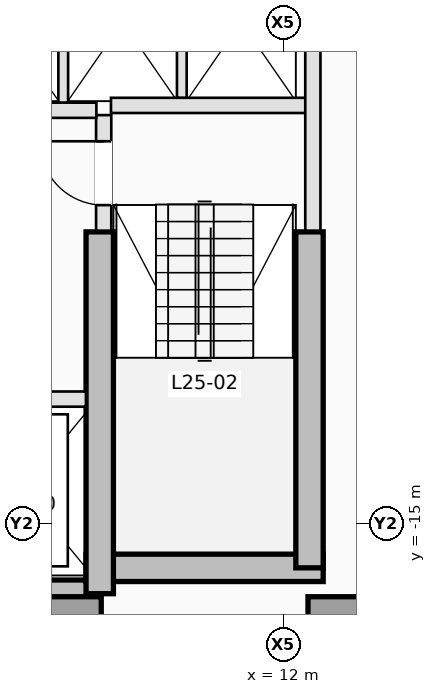
"""IFC4 building model, lengths in metres.
Left out: names, types, materials, properties, quantities, classifications, styles, units other than length and angle.
Written with IfcOpenShell. Run it as: python <this file> out.ifc"""

import sys

from ifc_helpers import new_model, si_unit, direction, frame, frame_2d, origin, origin_2d, place, context, subcontext, project, spatial, rectangle, extrude, element, fill, save


model = new_model("IFC4")
c1 = context("Model", 3, precision=1e-05, world=origin(), true_north=direction((0.0, 1.0)))
c2 = subcontext(c1, "Body", "Model", "MODEL_VIEW")
j1 = project(units=[si_unit("LENGTHUNIT", "METRE"), si_unit("PLANEANGLEUNIT", "RADIAN")], contexts=[c1])
p1 = place(None, origin())
s1 = spatial("IfcSite", under=j1, at=p1, CompositionType="ELEMENT")
p2 = place(p1, origin())
s2 = spatial("IfcBuilding", under=s1, at=p2, CompositionType="ELEMENT")
p3 = place(p2, frame((0.0, 0.0, 95.0)))
s3 = spatial("IfcBuildingStorey", under=s2, at=p3, CompositionType="ELEMENT", Elevation=95.0)
p4 = place(p3, frame((3.75, -16.15, 0.0), z_axis=(0.0, 0.0, 1.0), x_axis=(1.0, 0.0, 0.0)))
e1 = element("IfcWall", 1, at=p4, inside=s3, PredefinedType="SHEAR", context=c2, shape_type="SweptSolid", body=[
    extrude(rectangle(XDim=5.225, YDim=0.45, at=frame_2d((2.613, 0.0))), origin(), (0.0, 0.0, 1.0), 3.5),
])
p5 = place(p3, frame((8.75, -15.725, 0.0), z_axis=(0.0, 0.0, 1.0), x_axis=(1.0, 0.0, 0.0)))
e2 = element("IfcWall", 2, at=p5, inside=s3, PredefinedType="SHEAR", context=c2, shape_type="SweptSolid", body=[
    extrude(rectangle(XDim=3.9, YDim=0.45, at=frame_2d((1.95, 0.0))), origin(), (0.0, 0.0, 1.0), 3.5),
])
p6 = place(p3, frame((12.425, -15.725, 0.0), z_axis=(0.0, 0.0, 1.0), x_axis=(0.0, 1.0, 0.0)))
e3 = element("IfcWall", 3, at=p6, inside=s3, PredefinedType="SHEAR", context=c2, shape_type="SweptSolid", body=[
    extrude(rectangle(XDim=5.525, YDim=0.45, at=frame_2d((2.763, 0.0))), origin(), (0.0, 0.0, 1.0), 3.5),
])
p7 = place(p3, frame((8.975, -16.15, 0.0), z_axis=(0.0, 0.0, 1.0), x_axis=(0.0, 1.0, 0.0)))
e4 = element("IfcWall", 4, at=p7, inside=s3, PredefinedType="SHEAR", context=c2, shape_type="SweptSolid", body=[
    extrude(rectangle(XDim=5.95, YDim=0.45, at=frame_2d((2.975, 0.0))), origin(), (0.0, 0.0, 1.0), 3.5),
])
for number, where, z_axis, x_axis in (
    (5, (8.45, -16.75, 0.0), (0.0, 0.0, 1.0), (1.0, 0.0, 0.0)),
    (6, (12.95, -16.75, 0.0), (0.0, 0.0, 1.0), (1.0, 0.0, 0.0)),
):
    element("IfcColumn", number, at=place(p3, frame(where, z_axis=z_axis, x_axis=x_axis)), inside=s3, PredefinedType="COLUMN", context=c2, shape_type="SweptSolid", body=[
        extrude(rectangle(XDim=1.1, YDim=1.1, at=origin_2d()), origin(), (0.0, 0.0, 1.0), 3.5),
    ])
p8 = place(p3, frame((9.04, -10.18, 0.0), z_axis=(0.0, 0.0, 1.0), x_axis=(0.0, 1.0, 0.0)))
e7 = element("IfcWall", 7, at=p8, inside=s3, PredefinedType="PARTITIONING", context=c2, shape_type="SweptSolid", body=[
    extrude(rectangle(XDim=1.9, YDim=0.25, at=frame_2d((0.95, 0.0))), origin(), (0.0, 0.0, 1.0), 3.25),
])
p9 = place(p8, frame((0.42, 0.0, 0.0)))
e8 = element("IfcOpeningElement", 8, at=p9, cuts=e7, PredefinedType="OPENING", context=c2, shape_type="SweptSolid", body=[
    extrude(rectangle(XDim=1.05, YDim=2.15, at=frame_2d((0.525, 1.075))), frame((0.0, 0.135, 0.0), z_axis=(0.0, -1.0, 0.0), x_axis=(1.0, 0.0, 0.0)), (0.0, 0.0, 1.0), 0.27),
])
p10 = place(p3, frame((9.16, -8.12, 0.0), z_axis=(0.0, 0.0, 1.0), x_axis=(1.0, 0.0, 0.0)))
e9 = element("IfcWall", 9, at=p10, inside=s3, PredefinedType="PARTITIONING", context=c2, shape_type="SweptSolid", body=[
    extrude(rectangle(XDim=3.22, YDim=0.25, at=frame_2d((1.61, 0.0))), origin(), (0.0, 0.0, 1.0), 3.25),
])
p11 = place(p3, frame((12.48, -10.18, 0.0), z_axis=(0.0, 0.0, 1.0), x_axis=(0.0, 1.0, 0.0)))
e10 = element("IfcWall", 10, at=p11, inside=s3, PredefinedType="PARTITIONING", context=c2, shape_type="SweptSolid", body=[
    extrude(rectangle(XDim=4.828, YDim=0.25, at=frame_2d((2.414, 0.0))), origin(), (0.0, 0.0, 1.0), 3.25),
])
p12 = place(p3, frame((3.68, -12.95, 0.0), z_axis=(0.0, 0.0, 1.0), x_axis=(1.0, 0.0, 0.0)))
e11 = element("IfcWall", 11, at=p12, inside=s3, PredefinedType="PARTITIONING", context=c2, shape_type="SweptSolid", body=[
    extrude(rectangle(XDim=5.068, YDim=0.25, at=frame_2d((2.534, 0.0))), origin(), (0.0, 0.0, 1.0), 3.25),
])
p13 = place(p12, frame((3.32, 0.0, 0.0)))
e12 = element("IfcOpeningElement", 12, at=p13, cuts=e11, PredefinedType="OPENING", context=c2, shape_type="SweptSolid", body=[
    extrude(rectangle(XDim=1.1, YDim=2.15, at=frame_2d((0.55, 1.075))), frame((0.0, 0.135, 0.0), z_axis=(0.0, -1.0, 0.0), x_axis=(1.0, 0.0, 0.0)), (0.0, 0.0, 1.0), 0.27),
])
p14 = place(p12, frame((0.67, 0.0, 0.0)))
e13 = element("IfcOpeningElement", 13, at=p14, cuts=e11, PredefinedType="OPENING", context=c2, shape_type="SweptSolid", body=[
    extrude(rectangle(XDim=1.2, YDim=2.15, at=frame_2d((0.6, 1.075))), frame((0.0, 0.135, 0.0), z_axis=(0.0, -1.0, 0.0), x_axis=(1.0, 0.0, 0.0)), (0.0, 0.0, 1.0), 0.27),
])
p15 = place(p3, frame((3.68, -8.2, 0.0), z_axis=(0.0, 0.0, 1.0), x_axis=(1.0, 0.0, 0.0)))
e14 = element("IfcWall", 14, at=p15, inside=s3, PredefinedType="PARTITIONING", context=c2, shape_type="SweptSolid", body=[
    extrude(rectangle(XDim=5.24, YDim=0.25, at=frame_2d((2.62, 0.0))), origin(), (0.0, 0.0, 1.0), 3.25),
])
p16 = place(p3, frame((8.375, -8.073, 0.0), z_axis=(0.0, 0.0, 1.0), x_axis=(0.0, 1.0, 0.0)))
e15 = element("IfcWall", 15, at=p16, inside=s3, PredefinedType="PARTITIONING", context=c2, shape_type="SweptSolid", body=[
    extrude(rectangle(XDim=2.733, YDim=0.16, at=frame_2d((1.366, 0.0))), origin(), (0.0, 0.0, 1.0), 3.25),
])
p17 = place(p3, frame((10.325, -7.993, 0.0), z_axis=(0.0, 0.0, 1.0), x_axis=(0.0, 1.0, 0.0)))
e16 = element("IfcWall", 16, at=p17, inside=s3, PredefinedType="PARTITIONING", context=c2, shape_type="SweptSolid", body=[
    extrude(rectangle(XDim=2.653, YDim=0.16, at=frame_2d((1.326, 0.0))), origin(), (0.0, 0.0, 1.0), 3.25),
])
p18 = place(p9, origin())
e17 = element("IfcDoor", 17, at=p18, inside=s3, OperationType="SINGLE_SWING_RIGHT", PredefinedType="DOOR", context=c2, shape_type="SweptSolid", body=[
    extrude(rectangle(XDim=1.05, YDim=2.15, at=frame_2d((0.525, 1.075))), frame((0.0, 0.025, 0.0), z_axis=(0.0, -1.0, 0.0), x_axis=(1.0, 0.0, 0.0)), (0.0, 0.0, 1.0), 0.05),
])
fill(e8, e17)
save(model, sys.argv[1])
